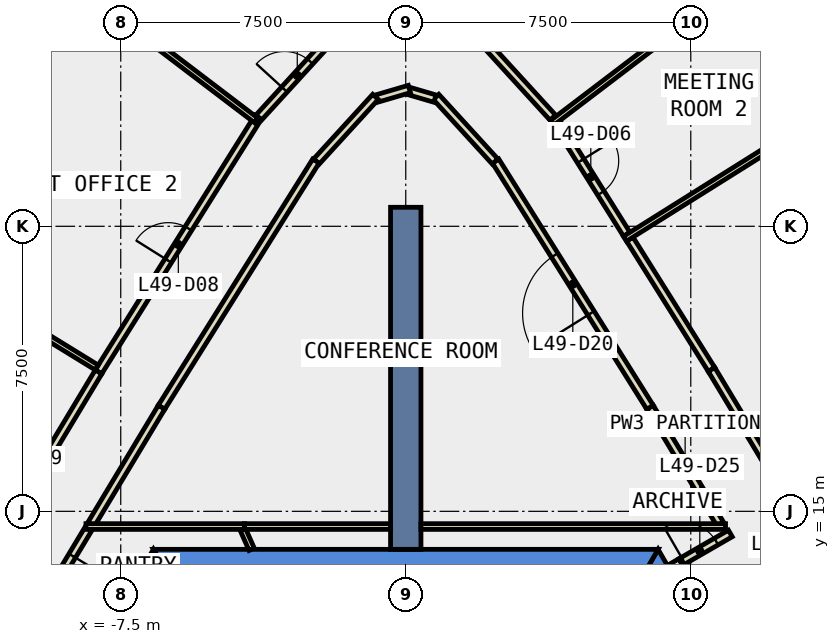
"""IFC4 building model, lengths in metres.
Left out: names, types, materials, properties, quantities, classifications, styles, units other than length and angle.
Written with IfcOpenShell. Run it as: python <this file> out.ifc"""

import sys

from ifc_helpers import new_model, si_unit, direction, frame, frame_2d, origin, place, context, subcontext, project, spatial, polyline, rectangle, outline, extrude, element, fill, save


model = new_model("IFC4")
c1 = context("Model", 3, precision=1e-05, world=origin(), true_north=direction((0.0, 1.0)))
c2 = subcontext(c1, "Body", "Model", "MODEL_VIEW")
j1 = project(units=[si_unit("LENGTHUNIT", "METRE"), si_unit("PLANEANGLEUNIT", "RADIAN")], contexts=[c1])
p1 = place(None, origin())
s1 = spatial("IfcSite", under=j1, at=p1, CompositionType="ELEMENT")
p2 = place(p1, origin())
s2 = spatial("IfcBuilding", under=s1, at=p2, CompositionType="ELEMENT")
p3 = place(p2, frame((0.0, 0.0, 219.2)))
s3 = spatial("IfcBuildingStorey", under=s2, at=p3, CompositionType="ELEMENT", Elevation=219.2)
p4 = place(p3, frame((0.0, 0.0, -0.4)))
e1 = element("IfcWall", 1, at=p4, inside=s3, PredefinedType="SHEAR", context=c2, shape_type="SweptSolid", body=[
    extrude(outline(polyline([(6.478, 12.88), (7.084, 13.23), (6.64, 14.0), (6.235, 13.3), (6.478, 12.88)])), origin(), (0.0, 0.0, 1.0), 4.2),
])
p5 = place(p3, frame((0.0, 0.0, -0.4)))
e2 = element("IfcWall", 2, at=p5, inside=s3, PredefinedType="SHEAR", context=c2, shape_type="SweptSolid", body=[
    extrude(outline(polyline([(6.64, 14.0), (-6.64, 14.0), (-6.235, 13.3), (6.235, 13.3), (6.64, 14.0)])), origin(), (0.0, 0.0, 1.0), 4.2),
])
p6 = place(p3, frame((0.0, 0.0, -0.4)))
e3 = element("IfcWall", 3, at=p6, inside=s3, PredefinedType="SHEAR", context=c2, shape_type="SweptSolid", body=[
    extrude(outline(polyline([(-11.834, 5.002), (-11.228, 4.652), (-6.235, 13.3), (-6.64, 14.0), (-11.834, 5.002)])), origin(), (0.0, 0.0, 1.0), 4.2),
])
p7 = place(p3, frame((0.0, 14.0, -0.4), z_axis=(0.0, 0.0, 1.0), x_axis=(0.0, 1.0, 0.0)))
e4 = element("IfcWall", 4, at=p7, inside=s3, PredefinedType="SHEAR", context=c2, shape_type="SweptSolid", body=[
    extrude(rectangle(XDim=9.0, YDim=0.8, at=frame_2d((4.5, 0.0))), origin(), (0.0, 0.0, 1.0), 4.2),
])
p8 = place(p3, frame((13.021, 22.374, 0.0), z_axis=(0.0, 0.0, 1.0), x_axis=(-0.531239262679, 0.847221839773, 0.0)))
e5 = element("IfcWall", 5, at=p8, inside=s3, PredefinedType="STANDARD", context=c2, shape_type="SweptSolid", body=[
    extrude(rectangle(XDim=7.339, YDim=0.3, at=frame_2d((3.67, 0.0))), origin(), (0.0, 0.0, 1.0), 3.8),
])
p9 = place(p8, frame((0.635, 0.0, 0.9)))
e6 = element("IfcOpeningElement", 6, at=p9, cuts=e5, PredefinedType="OPENING", context=c2, shape_type="SweptSolid", body=[
    extrude(rectangle(XDim=2.4, YDim=2.6, at=frame_2d((1.2, 1.3))), frame((0.0, 0.16, 0.0), z_axis=(0.0, -1.0, 0.0), x_axis=(1.0, 0.0, 0.0)), (0.0, 0.0, 1.0), 0.32),
])
p10 = place(p8, frame((4.304, 0.0, 0.9)))
e7 = element("IfcOpeningElement", 7, at=p10, cuts=e5, PredefinedType="OPENING", context=c2, shape_type="SweptSolid", body=[
    extrude(rectangle(XDim=2.4, YDim=2.6, at=frame_2d((1.2, 1.3))), frame((0.0, 0.16, 0.0), z_axis=(0.0, -1.0, 0.0), x_axis=(1.0, 0.0, 0.0)), (0.0, 0.0, 1.0), 0.32),
])
p11 = place(p3, frame((-9.122, 28.592, 0.0), z_axis=(0.0, 0.0, 1.0), x_axis=(-0.531239262679, -0.847221839773, 0.0)))
e8 = element("IfcWall", 8, at=p11, inside=s3, PredefinedType="STANDARD", context=c2, shape_type="SweptSolid", body=[
    extrude(rectangle(XDim=7.339, YDim=0.3, at=frame_2d((3.67, 0.0))), origin(), (0.0, 0.0, 1.0), 3.8),
])
p12 = place(p11, frame((0.635, 0.0, 0.9)))
e9 = element("IfcOpeningElement", 9, at=p12, cuts=e8, PredefinedType="OPENING", context=c2, shape_type="SweptSolid", body=[
    extrude(rectangle(XDim=2.4, YDim=2.6, at=frame_2d((1.2, 1.3))), frame((0.0, 0.16, 0.0), z_axis=(0.0, -1.0, 0.0), x_axis=(1.0, 0.0, 0.0)), (0.0, 0.0, 1.0), 0.32),
])
p13 = place(p11, frame((4.304, 0.0, 0.9)))
e10 = element("IfcOpeningElement", 10, at=p13, cuts=e8, PredefinedType="OPENING", context=c2, shape_type="SweptSolid", body=[
    extrude(rectangle(XDim=2.4, YDim=2.6, at=frame_2d((1.2, 1.3))), frame((0.0, 0.16, 0.0), z_axis=(0.0, -1.0, 0.0), x_axis=(1.0, 0.0, 0.0)), (0.0, 0.0, 1.0), 0.32),
])
p14 = place(p3, frame((6.934, 13.49, 0.0), z_axis=(0.0, 0.0, 1.0), x_axis=(0.865871789474, 0.500265973451, 0.0)))
e11 = element("IfcWall", 11, at=p14, inside=s3, PredefinedType="PARTITIONING", context=c2, shape_type="SweptSolid", body=[
    extrude(rectangle(XDim=0.35, YDim=0.2, at=frame_2d((0.175, 0.0))), origin(), (0.0, 0.0, 1.0), 2.4),
])
p15 = place(p3, frame((-8.353, 14.536, 0.0), z_axis=(0.0, 0.0, 1.0), x_axis=(-0.515636196259, -0.856807628997, 0.0)))
e12 = element("IfcWall", 12, at=p15, inside=s3, PredefinedType="PARTITIONING", context=c2, shape_type="SweptSolid", body=[
    extrude(rectangle(XDim=2.643, YDim=0.2, at=frame_2d((1.322, 0.0))), origin(), (0.0, 0.0, 1.0), 3.8),
])
p16 = place(p15, frame((0.822, 0.0, 0.0)))
e13 = element("IfcOpeningElement", 13, at=p16, cuts=e12, PredefinedType="OPENING", context=c2, shape_type="SweptSolid", body=[
    extrude(rectangle(XDim=1.0, YDim=2.1, at=frame_2d((0.5, 1.05))), frame((0.0, 0.11, 0.0), z_axis=(0.0, -1.0, 0.0), x_axis=(1.0, 0.0, 0.0)), (0.0, 0.0, 1.0), 0.22),
])
p17 = place(p3, frame((8.276, 14.664, 0.0), z_axis=(0.0, 0.0, 1.0), x_axis=(-0.515416266777, 0.85693994652, 0.0)))
e14 = element("IfcWall", 14, at=p17, inside=s3, PredefinedType="PARTITIONING", context=c2, shape_type="SweptSolid", body=[
    extrude(rectangle(XDim=3.587, YDim=0.2, at=frame_2d((1.793, 0.0))), origin(), (0.0, 0.0, 1.0), 3.8),
])
p18 = place(p3, frame((6.427, 17.738, 0.0), z_axis=(0.0, 0.0, 1.0), x_axis=(-0.531335643981, 0.847161397512, 0.0)))
e15 = element("IfcWall", 15, at=p18, inside=s3, PredefinedType="PARTITIONING", context=c2, shape_type="SweptSolid", body=[
    extrude(rectangle(XDim=7.647, YDim=0.2, at=frame_2d((3.823, 0.0))), origin(), (0.0, 0.0, 1.0), 3.8),
])
p19 = place(p18, frame((2.923, 0.0, 0.0)))
e16 = element("IfcOpeningElement", 16, at=p19, cuts=e15, PredefinedType="OPENING", context=c2, shape_type="SweptSolid", body=[
    extrude(rectangle(XDim=1.8, YDim=2.1, at=frame_2d((0.9, 1.05))), frame((0.0, 0.11, 0.0), z_axis=(0.0, -1.0, 0.0), x_axis=(1.0, 0.0, 0.0)), (0.0, 0.0, 1.0), 0.22),
])
p20 = place(p3, frame((2.35, 24.205, 0.0), z_axis=(0.0, 0.0, 1.0), x_axis=(-0.67475930229, 0.738037860799, 0.0)))
e17 = element("IfcWall", 17, at=p20, inside=s3, PredefinedType="PARTITIONING", context=c2, shape_type="SweptSolid", body=[
    extrude(rectangle(XDim=2.303, YDim=0.2, at=frame_2d((1.152, 0.0))), origin(), (0.0, 0.0, 1.0), 3.8),
])
p21 = place(p3, frame((0.768, 25.86, 0.0), z_axis=(0.0, 0.0, 1.0), x_axis=(-0.959714481723, 0.280977069476, 0.0)))
e18 = element("IfcWall", 18, at=p21, inside=s3, PredefinedType="PARTITIONING", context=c2, shape_type="SweptSolid", body=[
    extrude(rectangle(XDim=0.7, YDim=0.2, at=frame_2d((0.35, 0.0))), origin(), (0.0, 0.0, 1.0), 3.8),
])
p22 = place(p3, frame((0.096, 26.113, 0.0), z_axis=(0.0, 0.0, 1.0), x_axis=(-0.959723140705, -0.280947491882, 0.0)))
e19 = element("IfcWall", 19, at=p22, inside=s3, PredefinedType="PARTITIONING", context=c2, shape_type="SweptSolid", body=[
    extrude(rectangle(XDim=0.9, YDim=0.2, at=frame_2d((0.45, 0.0))), origin(), (0.0, 0.0, 1.0), 3.8),
])
p23 = place(p3, frame((-0.796, 25.905, 0.0), z_axis=(0.0, 0.0, 1.0), x_axis=(-0.67475930229, -0.738037860799, 0.0)))
e20 = element("IfcWall", 20, at=p23, inside=s3, PredefinedType="PARTITIONING", context=c2, shape_type="SweptSolid", body=[
    extrude(rectangle(XDim=2.303, YDim=0.2, at=frame_2d((1.152, 0.0))), origin(), (0.0, 0.0, 1.0), 3.8),
])
p24 = place(p3, frame((-2.364, 24.216, 0.0), z_axis=(0.0, 0.0, 1.0), x_axis=(-0.531335643981, -0.847161397512, 0.0)))
e21 = element("IfcWall", 21, at=p24, inside=s3, PredefinedType="PARTITIONING", context=c2, shape_type="SweptSolid", body=[
    extrude(rectangle(XDim=7.647, YDim=0.2, at=frame_2d((3.823, 0.0))), origin(), (0.0, 0.0, 1.0), 3.8),
])
p25 = place(p3, frame((-6.427, 17.738, 0.0), z_axis=(0.0, 0.0, 1.0), x_axis=(-0.515416266777, -0.85693994652, 0.0)))
e22 = element("IfcWall", 22, at=p25, inside=s3, PredefinedType="PARTITIONING", context=c2, shape_type="SweptSolid", body=[
    extrude(rectangle(XDim=3.587, YDim=0.2, at=frame_2d((1.793, 0.0))), origin(), (0.0, 0.0, 1.0), 3.8),
])
p26 = place(p3, frame((5.895, 22.162, 0.0), z_axis=(0.0, 0.0, 1.0), x_axis=(0.531245023709, -0.847218227368, 0.0)))
e23 = element("IfcWall", 23, at=p26, inside=s3, PredefinedType="PARTITIONING", context=c2, shape_type="SweptSolid", body=[
    extrude(rectangle(XDim=4.049, YDim=0.2, at=frame_2d((2.024, 0.0))), origin(), (0.0, 0.0, 1.0), 3.8),
])
p27 = place(p3, frame((8.046, 18.732, 0.0), z_axis=(0.0, 0.0, 1.0), x_axis=(0.515502328211, -0.856888178007, 0.0)))
e24 = element("IfcWall", 24, at=p27, inside=s3, PredefinedType="PARTITIONING", context=c2, shape_type="SweptSolid", body=[
    extrude(rectangle(XDim=8.058, YDim=0.2, at=frame_2d((4.029, 0.0))), origin(), (0.0, 0.0, 1.0), 3.8),
])
p28 = place(p27, frame((3.604, 0.0, 0.0)))
e25 = element("IfcOpeningElement", 25, at=p28, cuts=e24, PredefinedType="OPENING", context=c2, shape_type="SweptSolid", body=[
    extrude(rectangle(XDim=1.0, YDim=2.1, at=frame_2d((0.5, 1.05))), frame((0.0, 0.11, 0.0), z_axis=(0.0, -1.0, 0.0), x_axis=(1.0, 0.0, 0.0)), (0.0, 0.0, 1.0), 0.22),
])
p29 = place(p3, frame((3.923, 25.307, 0.0), z_axis=(0.0, 0.0, 1.0), x_axis=(0.531150612982, -0.847277419934, 0.0)))
e26 = element("IfcWall", 26, at=p29, inside=s3, PredefinedType="PARTITIONING", context=c2, shape_type="SweptSolid", body=[
    extrude(rectangle(XDim=3.562, YDim=0.2, at=frame_2d((1.781, 0.0))), origin(), (0.0, 0.0, 1.0), 3.8),
])
p30 = place(p29, frame((1.281, 0.0, 0.0)))
e27 = element("IfcOpeningElement", 27, at=p30, cuts=e26, PredefinedType="OPENING", context=c2, shape_type="SweptSolid", body=[
    extrude(rectangle(XDim=1.0, YDim=2.1, at=frame_2d((0.5, 1.05))), frame((0.0, 0.11, 0.0), z_axis=(0.0, -1.0, 0.0), x_axis=(1.0, 0.0, 0.0)), (0.0, 0.0, 1.0), 0.22),
])
p31 = place(p3, frame((-3.869, 25.36, 0.0), z_axis=(0.0, 0.0, 1.0), x_axis=(0.674594755709, 0.738188265668, 0.0)))
e28 = element("IfcWall", 28, at=p31, inside=s3, PredefinedType="PARTITIONING", context=c2, shape_type="SweptSolid", body=[
    extrude(rectangle(XDim=3.006, YDim=0.2, at=frame_2d((1.503, 0.0))), origin(), (0.0, 0.0, 1.0), 3.8),
])
p32 = place(p31, frame((1.003, 0.0, 0.0)))
e29 = element("IfcOpeningElement", 29, at=p32, cuts=e28, PredefinedType="OPENING", context=c2, shape_type="SweptSolid", body=[
    extrude(rectangle(XDim=1.0, YDim=2.1, at=frame_2d((0.5, 1.05))), frame((0.0, 0.11, 0.0), z_axis=(0.0, -1.0, 0.0), x_axis=(1.0, 0.0, 0.0)), (0.0, 0.0, 1.0), 0.22),
])
p33 = place(p3, frame((1.841, 27.579, 0.0), z_axis=(0.0, 0.0, 1.0), x_axis=(0.674594755709, -0.738188265668, 0.0)))
e30 = element("IfcWall", 30, at=p33, inside=s3, PredefinedType="PARTITIONING", context=c2, shape_type="SweptSolid", body=[
    extrude(rectangle(XDim=3.006, YDim=0.2, at=frame_2d((1.503, 0.0))), origin(), (0.0, 0.0, 1.0), 3.8),
])
p34 = place(p3, frame((-8.086, 18.669, 0.0), z_axis=(0.0, 0.0, 1.0), x_axis=(0.531329962263, 0.847164961033, 0.0)))
e31 = element("IfcWall", 31, at=p34, inside=s3, PredefinedType="PARTITIONING", context=c2, shape_type="SweptSolid", body=[
    extrude(rectangle(XDim=7.91, YDim=0.2, at=frame_2d((3.955, 0.0))), origin(), (0.0, 0.0, 1.0), 3.8),
])
p35 = place(p34, frame((3.455, 0.0, 0.0)))
e32 = element("IfcOpeningElement", 32, at=p35, cuts=e31, PredefinedType="OPENING", context=c2, shape_type="SweptSolid", body=[
    extrude(rectangle(XDim=1.0, YDim=2.1, at=frame_2d((0.5, 1.05))), frame((0.0, 0.11, 0.0), z_axis=(0.0, -1.0, 0.0), x_axis=(1.0, 0.0, 0.0)), (0.0, 0.0, 1.0), 0.22),
])
p36 = place(p3, frame((-12.239, 11.763, 0.0), z_axis=(0.0, 0.0, 1.0), x_axis=(0.515591302858, 0.856834644734, 0.0)))
e33 = element("IfcWall", 33, at=p36, inside=s3, PredefinedType="PARTITIONING", context=c2, shape_type="SweptSolid", body=[
    extrude(rectangle(XDim=8.059, YDim=0.2, at=frame_2d((4.029, 0.0))), origin(), (0.0, 0.0, 1.0), 3.8),
])
p37 = place(p36, frame((3.604, 0.0, 0.0)))
e34 = element("IfcOpeningElement", 34, at=p37, cuts=e33, PredefinedType="OPENING", context=c2, shape_type="SweptSolid", body=[
    extrude(rectangle(XDim=1.0, YDim=2.1, at=frame_2d((0.5, 1.05))), frame((0.0, 0.11, 0.0), z_axis=(0.0, -1.0, 0.0), x_axis=(1.0, 0.0, 0.0)), (0.0, 0.0, 1.0), 0.22),
])
p38 = place(p3, frame((-4.055, 14.0, 0.0), z_axis=(0.0, 0.0, 1.0), x_axis=(-0.404850841056, 0.914382740703, 0.0)))
e35 = element("IfcWall", 35, at=p38, inside=s3, PredefinedType="PARTITIONING", context=c2, shape_type="SweptSolid", body=[
    extrude(rectangle(XDim=0.581, YDim=0.15, at=frame_2d((0.291, 0.0))), origin(), (0.0, 0.0, 1.0), 3.8),
])
p39 = place(p3, frame((8.415, 14.6, 0.0), z_axis=(0.0, 0.0, 1.0), x_axis=(-1.0, 0.0, 0.0)))
e36 = element("IfcWall", 36, at=p39, inside=s3, PredefinedType="PARTITIONING", context=c2, shape_type="SweptSolid", body=[
    extrude(rectangle(XDim=8.015, YDim=0.15, at=frame_2d((4.008, 0.0))), origin(), (0.0, 0.0, 1.0), 3.8),
])
p40 = place(p3, frame((-4.245, 14.6, 0.0), z_axis=(0.0, 0.0, 1.0), x_axis=(-1.0, 0.0, 0.0)))
e37 = element("IfcWall", 37, at=p40, inside=s3, PredefinedType="PARTITIONING", context=c2, shape_type="SweptSolid", body=[
    extrude(rectangle(XDim=4.17, YDim=0.15, at=frame_2d((2.085, 0.0))), origin(), (0.0, 0.0, 1.0), 3.8),
])
p41 = place(p3, frame((5.77, 22.172, 0.0), z_axis=(0.0, 0.0, 1.0), x_axis=(0.847187879248, 0.531293419171, 0.0)))
e38 = element("IfcWall", 38, at=p41, inside=s3, PredefinedType="PARTITIONING", context=c2, shape_type="SweptSolid", body=[
    extrude(rectangle(XDim=6.1, YDim=0.15, at=frame_2d((3.05, 0.0))), origin(), (0.0, 0.0, 1.0), 3.8),
])
p42 = place(p3, frame((3.856, 25.225, 0.0), z_axis=(0.0, 0.0, 1.0), x_axis=(0.795987848728, 0.605312600792, 0.0)))
e39 = element("IfcWall", 39, at=p42, inside=s3, PredefinedType="PARTITIONING", context=c2, shape_type="SweptSolid", body=[
    extrude(rectangle(XDim=4.804, YDim=0.15, at=frame_2d((2.402, 0.0))), origin(), (0.0, 0.0, 1.0), 3.8),
])
p43 = place(p3, frame((-3.936, 25.286, 0.0), z_axis=(0.0, 0.0, 1.0), x_axis=(-0.795977117067, 0.605326712698, 0.0)))
e40 = element("IfcWall", 40, at=p43, inside=s3, PredefinedType="PARTITIONING", context=c2, shape_type="SweptSolid", body=[
    extrude(rectangle(XDim=4.704, YDim=0.15, at=frame_2d((2.352, 0.0))), origin(), (0.0, 0.0, 1.0), 3.8),
])
p44 = place(p3, frame((-8.131, 18.784, 0.0), z_axis=(0.0, 0.0, 1.0), x_axis=(-0.851969320918, 0.52359170755, 0.0)))
e41 = element("IfcWall", 41, at=p44, inside=s3, PredefinedType="PARTITIONING", context=c2, shape_type="SweptSolid", body=[
    extrude(rectangle(XDim=4.58, YDim=0.15, at=frame_2d((2.29, 0.0))), origin(), (0.0, 0.0, 1.0), 3.8),
])
p45 = place(p3, frame((-0.4, 14.6, 0.0), z_axis=(0.0, 0.0, 1.0), x_axis=(-1.0, 0.0, 0.0)))
e42 = element("IfcWall", 42, at=p45, inside=s3, PredefinedType="PARTITIONING", context=c2, shape_type="SweptSolid", body=[
    extrude(rectangle(XDim=3.845, YDim=0.15, at=frame_2d((1.923, 0.0))), origin(), (0.0, 0.0, 1.0), 3.8),
])
p46 = place(p3, frame((7.237, 13.665, 0.0), z_axis=(0.0, 0.0, 1.0), x_axis=(0.865999269783, 0.500045262687, 0.0)))
e43 = element("IfcWall", 43, at=p46, inside=s3, PredefinedType="PARTITIONING", context=c2, shape_type="SweptSolid", body=[
    extrude(rectangle(XDim=1.506, YDim=0.2, at=frame_2d((0.753, 0.0))), origin(), (0.0, 0.0, 1.0), 3.8),
])
p47 = place(p46, frame((0.078, 0.0, 0.0)))
e44 = element("IfcOpeningElement", 44, at=p47, cuts=e43, PredefinedType="OPENING", context=c2, shape_type="SweptSolid", body=[
    extrude(rectangle(XDim=1.0, YDim=2.1, at=frame_2d((0.5, 1.05))), frame((0.0, 0.11, 0.0), z_axis=(0.0, -1.0, 0.0), x_axis=(1.0, 0.0, 0.0)), (0.0, 0.0, 1.0), 0.22),
])
p48 = place(p30, origin())
e45 = element("IfcDoor", 45, at=p48, inside=s3, OperationType="SINGLE_SWING_LEFT", PredefinedType="DOOR", context=c2, shape_type="SweptSolid", body=[
    extrude(rectangle(XDim=1.0, YDim=2.1, at=frame_2d((0.5, 1.05))), frame((0.0, 0.025, 0.0), z_axis=(0.0, -1.0, 0.0), x_axis=(1.0, 0.0, 0.0)), (0.0, 0.0, 1.0), 0.05),
])
fill(e27, e45)
p49 = place(p32, origin())
e46 = element("IfcDoor", 46, at=p49, inside=s3, OperationType="SINGLE_SWING_LEFT", PredefinedType="DOOR", context=c2, shape_type="SweptSolid", body=[
    extrude(rectangle(XDim=1.0, YDim=2.1, at=frame_2d((0.5, 1.05))), frame((0.0, 0.025, 0.0), z_axis=(0.0, -1.0, 0.0), x_axis=(1.0, 0.0, 0.0)), (0.0, 0.0, 1.0), 0.05),
])
fill(e29, e46)
p50 = place(p35, origin())
e47 = element("IfcDoor", 47, at=p50, inside=s3, OperationType="SINGLE_SWING_RIGHT", PredefinedType="DOOR", context=c2, shape_type="SweptSolid", body=[
    extrude(rectangle(XDim=1.0, YDim=2.1, at=frame_2d((0.5, 1.05))), frame((0.0, 0.025, 0.0), z_axis=(0.0, -1.0, 0.0), x_axis=(1.0, 0.0, 0.0)), (0.0, 0.0, 1.0), 0.05),
])
fill(e32, e47)
p51 = place(p19, origin())
e48 = element("IfcDoor", 48, at=p51, inside=s3, OperationType="DOUBLE_DOOR_SINGLE_SWING", PredefinedType="DOOR", context=c2, shape_type="SweptSolid", body=[
    extrude(rectangle(XDim=1.8, YDim=2.1, at=frame_2d((0.9, 1.05))), frame((0.0, 0.025, 0.0), z_axis=(0.0, -1.0, 0.0), x_axis=(1.0, 0.0, 0.0)), (0.0, 0.0, 1.0), 0.05),
])
fill(e16, e48)
p52 = place(p47, origin())
e49 = element("IfcDoor", 49, at=p52, inside=s3, OperationType="SINGLE_SWING_LEFT", PredefinedType="DOOR", context=c2, shape_type="SweptSolid", body=[
    extrude(rectangle(XDim=1.0, YDim=2.1, at=frame_2d((0.5, 1.05))), frame((0.0, 0.025, 0.0), z_axis=(0.0, -1.0, 0.0), x_axis=(1.0, 0.0, 0.0)), (0.0, 0.0, 1.0), 0.05),
])
fill(e44, e49)
p53 = place(p16, origin())
e50 = element("IfcDoor", 50, at=p53, inside=s3, OperationType="SINGLE_SWING_LEFT", PredefinedType="DOOR", context=c2, shape_type="SweptSolid", body=[
    extrude(rectangle(XDim=1.0, YDim=2.1, at=frame_2d((0.5, 1.05))), frame((0.0, 0.025, 0.0), z_axis=(0.0, -1.0, 0.0), x_axis=(1.0, 0.0, 0.0)), (0.0, 0.0, 1.0), 0.05),
])
fill(e13, e50)
save(model, sys.argv[1])
